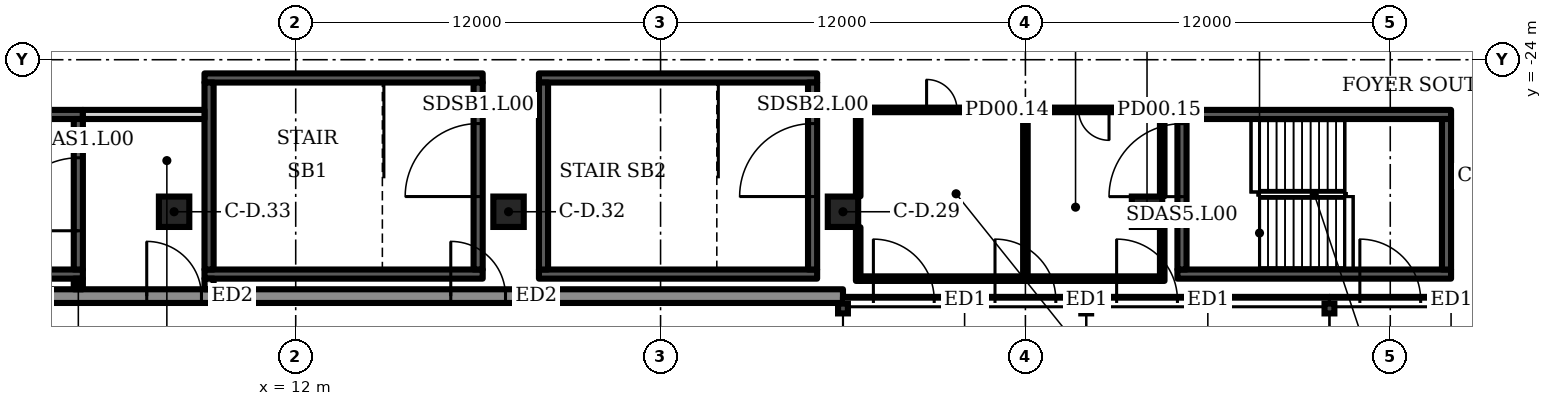
"""IFC4 building model, lengths in metres.
Left out: names, types, materials, properties, quantities, classifications, styles, units other than length and angle.
Written with IfcOpenShell. Run it as: python <this file> out.ifc"""

import sys

from ifc_helpers import new_model, si_unit, direction, frame, frame_2d, origin, origin_2d, place, context, subcontext, project, spatial, rectangle, hollow_circle, extrude, element, fill, save


model = new_model("IFC4")
c1 = context("Model", 3, precision=1e-05, world=origin(), true_north=direction((0.0, 1.0)))
c2 = subcontext(c1, "Body", "Model", "MODEL_VIEW")
j1 = project(units=[si_unit("LENGTHUNIT", "METRE"), si_unit("PLANEANGLEUNIT", "RADIAN")], contexts=[c1])
p1 = place(None, origin())
s1 = spatial("IfcSite", under=j1, at=p1, CompositionType="ELEMENT")
p2 = place(p1, origin())
s2 = spatial("IfcBuilding", under=s1, at=p2, CompositionType="ELEMENT")
p3 = place(p2, origin())
s3 = spatial("IfcBuildingStorey", under=s2, at=p3, CompositionType="ELEMENT", Elevation=0.0)
for number, where, z_axis, x_axis in (
    (1, (40.0, -29.0, 0.0), (0.0, 0.0, 1.0), (1.0, 0.0, 0.0)),
    (2, (30.0, -29.0, 0.0), (0.0, 0.0, 1.0), (1.0, 0.0, 0.0)),
    (3, (19.0, -29.0, 0.0), (0.0, 0.0, 1.0), (1.0, 0.0, 0.0)),
    (4, (8.0, -29.0, 0.0), (0.0, 0.0, 1.0), (1.0, 0.0, 0.0)),
):
    element("IfcColumn", number, at=place(p3, frame(where, z_axis=z_axis, x_axis=x_axis)), inside=s3, PredefinedType="COLUMN", context=c2, shape_type="SweptSolid", body=[
        extrude(rectangle(XDim=1.0, YDim=1.0, at=origin_2d()), origin(), (0.0, 0.0, 1.0), 8.0),
    ])
p4 = place(p3, frame((3.5, -31.775, 0.0), z_axis=(0.0, 0.0, 1.0), x_axis=(1.0, 0.0, 0.0)))
e5 = element("IfcWall", 5, at=p4, inside=s3, PredefinedType="SOLIDWALL", context=c2, shape_type="SweptSolid", body=[
    extrude(rectangle(XDim=26.5, YDim=0.45, at=frame_2d((13.25, 0.0))), origin(), (0.0, 0.0, 1.0), 7.7),
])
p5 = place(p4, frame((3.6, 0.0, 0.0)))
e6 = element("IfcOpeningElement", 6, at=p5, cuts=e5, PredefinedType="OPENING", context=c2, shape_type="SweptSolid", body=[
    extrude(rectangle(XDim=1.8, YDim=2.4, at=frame_2d((0.9, 1.2))), frame((0.0, 0.235, 0.0), z_axis=(0.0, -1.0, 0.0), x_axis=(1.0, 0.0, 0.0)), (0.0, 0.0, 1.0), 0.47),
])
p6 = place(p4, frame((13.6, 0.0, 0.0)))
e7 = element("IfcOpeningElement", 7, at=p6, cuts=e5, PredefinedType="OPENING", context=c2, shape_type="SweptSolid", body=[
    extrude(rectangle(XDim=1.8, YDim=2.4, at=frame_2d((0.9, 1.2))), frame((0.0, 0.235, 0.0), z_axis=(0.0, -1.0, 0.0), x_axis=(1.0, 0.0, 0.0)), (0.0, 0.0, 1.0), 0.47),
])
p7 = place(p3, frame((30.0, -31.9, 0.0), z_axis=(0.0, 0.0, 1.0), x_axis=(1.0, 0.0, 0.0)))
e8 = element("IfcWall", 8, at=p7, inside=s3, PredefinedType="SOLIDWALL", context=c2, shape_type="SweptSolid", body=[
    extrude(rectangle(XDim=8.0, YDim=0.2, at=frame_2d((4.0, 0.0))), origin(), (0.0, 0.0, 1.0), 2.6),
])
p8 = place(p7, frame((1.0, 0.0, 0.0)))
e9 = element("IfcOpeningElement", 9, at=p8, cuts=e8, PredefinedType="OPENING", context=c2, shape_type="SweptSolid", body=[
    extrude(rectangle(XDim=2.0, YDim=2.4, at=frame_2d((1.0, 1.2))), frame((0.0, 0.11, 0.0), z_axis=(0.0, -1.0, 0.0), x_axis=(1.0, 0.0, 0.0)), (0.0, 0.0, 1.0), 0.22),
])
p9 = place(p7, frame((5.0, 0.0, 0.0)))
e10 = element("IfcOpeningElement", 10, at=p9, cuts=e8, PredefinedType="OPENING", context=c2, shape_type="SweptSolid", body=[
    extrude(rectangle(XDim=2.0, YDim=2.4, at=frame_2d((1.0, 1.2))), frame((0.0, 0.11, 0.0), z_axis=(0.0, -1.0, 0.0), x_axis=(1.0, 0.0, 0.0)), (0.0, 0.0, 1.0), 0.22),
])
p10 = place(p3, frame((38.0, -31.9, 0.0), z_axis=(0.0, 0.0, 1.0), x_axis=(1.0, 0.0, 0.0)))
e11 = element("IfcWall", 11, at=p10, inside=s3, PredefinedType="SOLIDWALL", context=c2, shape_type="SweptSolid", body=[
    extrude(rectangle(XDim=8.0, YDim=0.2, at=frame_2d((4.0, 0.0))), origin(), (0.0, 0.0, 1.0), 2.6),
])
p11 = place(p10, frame((1.0, 0.0, 0.0)))
e12 = element("IfcOpeningElement", 12, at=p11, cuts=e11, PredefinedType="OPENING", context=c2, shape_type="SweptSolid", body=[
    extrude(rectangle(XDim=2.0, YDim=2.4, at=frame_2d((1.0, 1.2))), frame((0.0, 0.11, 0.0), z_axis=(0.0, -1.0, 0.0), x_axis=(1.0, 0.0, 0.0)), (0.0, 0.0, 1.0), 0.22),
])
p12 = place(p3, frame((46.0, -31.9, 0.0), z_axis=(0.0, 0.0, 1.0), x_axis=(1.0, 0.0, 0.0)))
e13 = element("IfcWall", 13, at=p12, inside=s3, PredefinedType="SOLIDWALL", context=c2, shape_type="SweptSolid", body=[
    extrude(rectangle(XDim=8.0, YDim=0.2, at=frame_2d((4.0, 0.0))), origin(), (0.0, 0.0, 1.0), 2.6),
])
p13 = place(p12, frame((1.0, 0.0, 0.0)))
e14 = element("IfcOpeningElement", 14, at=p13, cuts=e13, PredefinedType="OPENING", context=c2, shape_type="SweptSolid", body=[
    extrude(rectangle(XDim=2.0, YDim=2.4, at=frame_2d((1.0, 1.2))), frame((0.0, 0.11, 0.0), z_axis=(0.0, -1.0, 0.0), x_axis=(1.0, 0.0, 0.0)), (0.0, 0.0, 1.0), 0.22),
])
p14 = place(p12, frame((5.0, 0.0, 0.0)))
e15 = element("IfcOpeningElement", 15, at=p14, cuts=e13, PredefinedType="OPENING", context=c2, shape_type="SweptSolid", body=[
    extrude(rectangle(XDim=2.0, YDim=2.4, at=frame_2d((1.0, 1.2))), frame((0.0, 0.11, 0.0), z_axis=(0.0, -1.0, 0.0), x_axis=(1.0, 0.0, 0.0)), (0.0, 0.0, 1.0), 0.22),
])
p15 = place(p3, frame((30.575, -31.2, 0.0), z_axis=(0.0, 0.0, 1.0), x_axis=(1.0, 0.0, 0.0)))
e16 = element("IfcWall", 16, at=p15, inside=s3, PredefinedType="PARTITIONING", context=c2, shape_type="SweptSolid", body=[
    extrude(rectangle(XDim=5.35, YDim=0.15, at=frame_2d((2.675, 0.0))), origin(), (0.0, 0.0, 1.0), 7.7),
])
p16 = place(p3, frame((36.075, -31.2, 0.0), z_axis=(0.0, 0.0, 1.0), x_axis=(1.0, 0.0, 0.0)))
e17 = element("IfcWall", 17, at=p16, inside=s3, PredefinedType="PARTITIONING", context=c2, shape_type="SweptSolid", body=[
    extrude(rectangle(XDim=4.35, YDim=0.15, at=frame_2d((2.175, 0.0))), origin(), (0.0, 0.0, 1.0), 7.7),
])
p17 = place(p3, frame((36.0, -31.275, 0.0), z_axis=(0.0, 0.0, 1.0), x_axis=(0.0, 1.0, 0.0)))
e18 = element("IfcWall", 18, at=p17, inside=s3, PredefinedType="PARTITIONING", context=c2, shape_type="SweptSolid", body=[
    extrude(rectangle(XDim=5.7, YDim=0.15, at=frame_2d((2.85, 0.0))), origin(), (0.0, 0.0, 1.0), 7.7),
])
p18 = place(p3, frame((30.575, -25.65, 0.0), z_axis=(0.0, 0.0, 1.0), x_axis=(1.0, 0.0, 0.0)))
e19 = element("IfcWall", 19, at=p18, inside=s3, PredefinedType="PARTITIONING", context=c2, shape_type="SweptSolid", body=[
    extrude(rectangle(XDim=5.35, YDim=0.15, at=frame_2d((2.675, 0.0))), origin(), (0.0, 0.0, 1.0), 7.7),
])
p19 = place(p18, frame((2.175, 0.0, 0.0)))
e20 = element("IfcOpeningElement", 20, at=p19, cuts=e19, PredefinedType="OPENING", context=c2, shape_type="SweptSolid", body=[
    extrude(rectangle(XDim=1.0, YDim=2.1, at=frame_2d((0.5, 1.05))), frame((0.0, 0.085, 0.0), z_axis=(0.0, -1.0, 0.0), x_axis=(1.0, 0.0, 0.0)), (0.0, 0.0, 1.0), 0.17),
])
p20 = place(p3, frame((36.075, -25.65, 0.0), z_axis=(0.0, 0.0, 1.0), x_axis=(1.0, 0.0, 0.0)))
e21 = element("IfcWall", 21, at=p20, inside=s3, PredefinedType="PARTITIONING", context=c2, shape_type="SweptSolid", body=[
    extrude(rectangle(XDim=4.35, YDim=0.15, at=frame_2d((2.175, 0.0))), origin(), (0.0, 0.0, 1.0), 7.7),
])
p21 = place(p20, frame((1.675, 0.0, 0.0)))
e22 = element("IfcOpeningElement", 22, at=p21, cuts=e21, PredefinedType="OPENING", context=c2, shape_type="SweptSolid", body=[
    extrude(rectangle(XDim=1.0, YDim=2.1, at=frame_2d((0.5, 1.05))), frame((0.0, 0.085, 0.0), z_axis=(0.0, -1.0, 0.0), x_axis=(1.0, 0.0, 0.0)), (0.0, 0.0, 1.0), 0.17),
])
p22 = place(p3, frame((30.5, -31.275, 0.0), z_axis=(0.0, 0.0, 1.0), x_axis=(0.0, 1.0, 0.0)))
e23 = element("IfcWall", 23, at=p22, inside=s3, PredefinedType="PARTITIONING", context=c2, shape_type="SweptSolid", body=[
    extrude(rectangle(XDim=1.765, YDim=0.15, at=frame_2d((0.882, 0.0))), origin(), (0.0, 0.0, 1.0), 7.7),
])
p23 = place(p3, frame((30.5, -28.49, 0.0), z_axis=(0.0, 0.0, 1.0), x_axis=(0.0, 1.0, 0.0)))
e24 = element("IfcWall", 24, at=p23, inside=s3, PredefinedType="PARTITIONING", context=c2, shape_type="SweptSolid", body=[
    extrude(rectangle(XDim=2.915, YDim=0.15, at=frame_2d((1.458, 0.0))), origin(), (0.0, 0.0, 1.0), 7.7),
])
p24 = place(p3, frame((40.5, -31.275, 0.0), z_axis=(0.0, 0.0, 1.0), x_axis=(0.0, 1.0, 0.0)))
e25 = element("IfcWall", 25, at=p24, inside=s3, PredefinedType="PARTITIONING", context=c2, shape_type="SweptSolid", body=[
    extrude(rectangle(XDim=1.765, YDim=0.15, at=frame_2d((0.882, 0.0))), origin(), (0.0, 0.0, 1.0), 7.7),
])
p25 = place(p3, frame((40.5, -28.49, 0.0), z_axis=(0.0, 0.0, 1.0), x_axis=(0.0, 1.0, 0.0)))
e26 = element("IfcWall", 26, at=p25, inside=s3, PredefinedType="PARTITIONING", context=c2, shape_type="SweptSolid", body=[
    extrude(rectangle(XDim=2.915, YDim=0.15, at=frame_2d((1.458, 0.0))), origin(), (0.0, 0.0, 1.0), 7.7),
])
p26 = place(p3, frame((-4.5, -31.05, 0.0), z_axis=(0.0, 0.0, 1.0), x_axis=(1.0, 0.0, 0.0)))
e27 = element("IfcWall", 27, at=p26, inside=s3, PredefinedType="SHEAR", context=c2, shape_type="SweptSolid", body=[
    extrude(rectangle(XDim=9.5, YDim=0.3, at=frame_2d((4.75, 0.0))), origin(), (0.0, 0.0, 1.0), 7.7),
])
p27 = place(p3, frame((-4.0, -25.8, 0.0), z_axis=(0.0, 0.0, 1.0), x_axis=(1.0, 0.0, 0.0)))
e28 = element("IfcWall", 28, at=p27, inside=s3, PredefinedType="SHEAR", context=c2, shape_type="SweptSolid", body=[
    extrude(rectangle(XDim=9.0, YDim=0.3, at=frame_2d((4.5, 0.0))), origin(), (0.0, 0.0, 1.0), 7.7),
])
p28 = place(p3, frame((4.85, -30.9, 0.0), z_axis=(0.0, 0.0, 1.0), x_axis=(0.0, 1.0, 0.0)))
e29 = element("IfcWall", 29, at=p28, inside=s3, PredefinedType="SHEAR", context=c2, shape_type="SweptSolid", body=[
    extrude(rectangle(XDim=4.95, YDim=0.3, at=frame_2d((2.475, 0.0))), origin(), (0.0, 0.0, 1.0), 7.7),
])
p29 = place(p28, frame((1.275, 0.0, 0.0)))
e30 = element("IfcOpeningElement", 30, at=p29, cuts=e29, PredefinedType="OPENING", context=c2, shape_type="SweptSolid", body=[
    extrude(rectangle(XDim=2.4, YDim=2.1, at=frame_2d((1.2, 1.05))), frame((0.0, 0.16, 0.0), z_axis=(0.0, -1.0, 0.0), x_axis=(1.0, 0.0, 0.0)), (0.0, 0.0, 1.0), 0.32),
])
for number, where, z_axis, x_axis in (
    (31, (41.0, -31.05, 0.0), (0.0, 0.0, 1.0), (1.0, 0.0, 0.0)),
    (32, (41.0, -25.8, 0.0), (0.0, 0.0, 1.0), (1.0, 0.0, 0.0)),
):
    element("IfcWall", number, at=place(p3, frame(where, z_axis=z_axis, x_axis=x_axis)), inside=s3, PredefinedType="SHEAR", context=c2, shape_type="SweptSolid", body=[
        extrude(rectangle(XDim=9.0, YDim=0.3, at=frame_2d((4.5, 0.0))), origin(), (0.0, 0.0, 1.0), 7.7),
    ])
p30 = place(p3, frame((41.15, -30.9, 0.0), z_axis=(0.0, 0.0, 1.0), x_axis=(0.0, 1.0, 0.0)))
e33 = element("IfcWall", 33, at=p30, inside=s3, PredefinedType="SHEAR", context=c2, shape_type="SweptSolid", body=[
    extrude(rectangle(XDim=4.95, YDim=0.3, at=frame_2d((2.475, 0.0))), origin(), (0.0, 0.0, 1.0), 7.7),
])
p31 = place(p30, frame((2.397, 0.0, 0.0)))
e34 = element("IfcOpeningElement", 34, at=p31, cuts=e33, PredefinedType="OPENING", context=c2, shape_type="SweptSolid", body=[
    extrude(rectangle(XDim=2.4, YDim=2.1, at=frame_2d((1.2, 1.05))), frame((0.0, 0.16, 0.0), z_axis=(0.0, -1.0, 0.0), x_axis=(1.0, 0.0, 0.0)), (0.0, 0.0, 1.0), 0.32),
])
p32 = place(p3, frame((49.85, -30.9, 0.0), z_axis=(0.0, 0.0, 1.0), x_axis=(0.0, 1.0, 0.0)))
e35 = element("IfcWall", 35, at=p32, inside=s3, PredefinedType="SHEAR", context=c2, shape_type="SweptSolid", body=[
    extrude(rectangle(XDim=4.95, YDim=0.3, at=frame_2d((2.475, 0.0))), origin(), (0.0, 0.0, 1.0), 7.7),
])
for number, where, z_axis, x_axis in (
    (36, (9.0, -31.05, 0.0), (0.0, 0.0, 1.0), (1.0, 0.0, 0.0)),
    (37, (9.0, -24.6, 0.0), (0.0, 0.0, 1.0), (1.0, 0.0, 0.0)),
):
    element("IfcWall", number, at=place(p3, frame(where, z_axis=z_axis, x_axis=x_axis)), inside=s3, PredefinedType="SHEAR", context=c2, shape_type="SweptSolid", body=[
        extrude(rectangle(XDim=9.15, YDim=0.3, at=frame_2d((4.575, 0.0))), origin(), (0.0, 0.0, 1.0), 7.7),
    ])
p33 = place(p3, frame((9.15, -30.9, 0.0), z_axis=(0.0, 0.0, 1.0), x_axis=(0.0, 1.0, 0.0)))
e38 = element("IfcWall", 38, at=p33, inside=s3, PredefinedType="SHEAR", context=c2, shape_type="SweptSolid", body=[
    extrude(rectangle(XDim=6.15, YDim=0.3, at=frame_2d((3.075, 0.0))), origin(), (0.0, 0.0, 1.0), 7.7),
])
p34 = place(p3, frame((18.0, -30.9, 0.0), z_axis=(0.0, 0.0, 1.0), x_axis=(0.0, 1.0, 0.0)))
e39 = element("IfcWall", 39, at=p34, inside=s3, PredefinedType="SHEAR", context=c2, shape_type="SweptSolid", body=[
    extrude(rectangle(XDim=6.15, YDim=0.3, at=frame_2d((3.075, 0.0))), origin(), (0.0, 0.0, 1.0), 7.7),
])
p35 = place(p34, frame((2.4, 0.0, 0.0)))
e40 = element("IfcOpeningElement", 40, at=p35, cuts=e39, PredefinedType="OPENING", context=c2, shape_type="SweptSolid", body=[
    extrude(rectangle(XDim=2.4, YDim=2.1, at=frame_2d((1.2, 1.05))), frame((0.0, 0.16, 0.0), z_axis=(0.0, -1.0, 0.0), x_axis=(1.0, 0.0, 0.0)), (0.0, 0.0, 1.0), 0.32),
])
for number, where, z_axis, x_axis in (
    (41, (20.0, -31.05, 0.0), (0.0, 0.0, 1.0), (1.0, 0.0, 0.0)),
    (42, (20.0, -24.6, 0.0), (0.0, 0.0, 1.0), (1.0, 0.0, 0.0)),
):
    element("IfcWall", number, at=place(p3, frame(where, z_axis=z_axis, x_axis=x_axis)), inside=s3, PredefinedType="SHEAR", context=c2, shape_type="SweptSolid", body=[
        extrude(rectangle(XDim=9.15, YDim=0.3, at=frame_2d((4.575, 0.0))), origin(), (0.0, 0.0, 1.0), 7.7),
    ])
p36 = place(p3, frame((20.15, -30.9, 0.0), z_axis=(0.0, 0.0, 1.0), x_axis=(0.0, 1.0, 0.0)))
e43 = element("IfcWall", 43, at=p36, inside=s3, PredefinedType="SHEAR", context=c2, shape_type="SweptSolid", body=[
    extrude(rectangle(XDim=6.15, YDim=0.3, at=frame_2d((3.075, 0.0))), origin(), (0.0, 0.0, 1.0), 7.7),
])
p37 = place(p3, frame((29.0, -30.9, 0.0), z_axis=(0.0, 0.0, 1.0), x_axis=(0.0, 1.0, 0.0)))
e44 = element("IfcWall", 44, at=p37, inside=s3, PredefinedType="SHEAR", context=c2, shape_type="SweptSolid", body=[
    extrude(rectangle(XDim=6.15, YDim=0.3, at=frame_2d((3.075, 0.0))), origin(), (0.0, 0.0, 1.0), 7.7),
])
p38 = place(p37, frame((2.4, 0.0, 0.0)))
e45 = element("IfcOpeningElement", 45, at=p38, cuts=e44, PredefinedType="OPENING", context=c2, shape_type="SweptSolid", body=[
    extrude(rectangle(XDim=2.4, YDim=2.1, at=frame_2d((1.2, 1.05))), frame((0.0, 0.16, 0.0), z_axis=(0.0, -1.0, 0.0), x_axis=(1.0, 0.0, 0.0)), (0.0, 0.0, 1.0), 0.32),
])
p39 = place(p3, frame((5.0, -25.8, 0.0), z_axis=(0.0, 0.0, 1.0), x_axis=(1.0, 0.0, 0.0)))
e46 = element("IfcWall", 46, at=p39, inside=s3, PredefinedType="PARTITIONING", context=c2, shape_type="SweptSolid", body=[
    extrude(rectangle(XDim=4.0, YDim=0.3, at=frame_2d((2.0, 0.0))), origin(), (0.0, 0.0, 1.0), 7.7),
])
for number, where, z_axis, x_axis in (
    (47, (4.85, -31.55, 0.0), (0.0, 0.0, 1.0), (0.0, 1.0, 0.0)),
    (48, (9.15, -31.55, 0.0), (0.0, 0.0, 1.0), (0.0, 1.0, 0.0)),
):
    element("IfcWall", number, at=place(p3, frame(where, z_axis=z_axis, x_axis=x_axis)), inside=s3, PredefinedType="PARTITIONING", context=c2, shape_type="SweptSolid", body=[
        extrude(rectangle(XDim=0.35, YDim=0.3, at=frame_2d((0.175, 0.0))), origin(), (0.0, 0.0, 1.0), 7.7),
    ])
for number, where, z_axis, x_axis in (
    (49, (30.0, -32.182, 0.0), (0.0, 0.0, 1.0), (1.0, 0.0, 0.0)),
    (50, (38.0, -32.182, 0.0), (0.0, 0.0, 1.0), (1.0, 0.0, 0.0)),
    (51, (46.0, -32.182, 0.0), (0.0, 0.0, 1.0), (1.0, 0.0, 0.0)),
):
    element("IfcColumn", number, at=place(p3, frame(where, z_axis=z_axis, x_axis=x_axis)), inside=s3, PredefinedType="COLUMN", context=c2, shape_type="SweptSolid", body=[
        extrude(hollow_circle(Radius=0.162, WallThickness=0.01, at=origin_2d()), origin(), (0.0, 0.0, 1.0), 3.2),
    ])
p40 = place(p5, origin())
e52 = element("IfcDoor", 52, at=p40, inside=s3, OperationType="DOUBLE_DOOR_DOUBLE_SWING", PredefinedType="DOOR", context=c2, shape_type="SweptSolid", body=[
    extrude(rectangle(XDim=1.8, YDim=2.4, at=frame_2d((0.9, 1.2))), frame((0.0, 0.025, 0.0), z_axis=(0.0, -1.0, 0.0), x_axis=(1.0, 0.0, 0.0)), (0.0, 0.0, 1.0), 0.05),
])
fill(e6, e52)
p41 = place(p6, origin())
e53 = element("IfcDoor", 53, at=p41, inside=s3, OperationType="DOUBLE_DOOR_DOUBLE_SWING", PredefinedType="DOOR", context=c2, shape_type="SweptSolid", body=[
    extrude(rectangle(XDim=1.8, YDim=2.4, at=frame_2d((0.9, 1.2))), frame((0.0, 0.025, 0.0), z_axis=(0.0, -1.0, 0.0), x_axis=(1.0, 0.0, 0.0)), (0.0, 0.0, 1.0), 0.05),
])
fill(e7, e53)
p42 = place(p8, origin())
e54 = element("IfcDoor", 54, at=p42, inside=s3, OperationType="DOUBLE_DOOR_DOUBLE_SWING", PredefinedType="DOOR", context=c2, shape_type="SweptSolid", body=[
    extrude(rectangle(XDim=2.0, YDim=2.4, at=frame_2d((1.0, 1.2))), frame((0.0, 0.025, 0.0), z_axis=(0.0, -1.0, 0.0), x_axis=(1.0, 0.0, 0.0)), (0.0, 0.0, 1.0), 0.05),
])
fill(e9, e54)
p43 = place(p9, origin())
e55 = element("IfcDoor", 55, at=p43, inside=s3, OperationType="DOUBLE_DOOR_DOUBLE_SWING", PredefinedType="DOOR", context=c2, shape_type="SweptSolid", body=[
    extrude(rectangle(XDim=2.0, YDim=2.4, at=frame_2d((1.0, 1.2))), frame((0.0, 0.025, 0.0), z_axis=(0.0, -1.0, 0.0), x_axis=(1.0, 0.0, 0.0)), (0.0, 0.0, 1.0), 0.05),
])
fill(e10, e55)
p44 = place(p11, origin())
e56 = element("IfcDoor", 56, at=p44, inside=s3, OperationType="DOUBLE_DOOR_DOUBLE_SWING", PredefinedType="DOOR", context=c2, shape_type="SweptSolid", body=[
    extrude(rectangle(XDim=2.0, YDim=2.4, at=frame_2d((1.0, 1.2))), frame((0.0, 0.025, 0.0), z_axis=(0.0, -1.0, 0.0), x_axis=(1.0, 0.0, 0.0)), (0.0, 0.0, 1.0), 0.05),
])
fill(e12, e56)
p45 = place(p13, origin())
e57 = element("IfcDoor", 57, at=p45, inside=s3, OperationType="DOUBLE_DOOR_DOUBLE_SWING", PredefinedType="DOOR", context=c2, shape_type="SweptSolid", body=[
    extrude(rectangle(XDim=2.0, YDim=2.4, at=frame_2d((1.0, 1.2))), frame((0.0, 0.025, 0.0), z_axis=(0.0, -1.0, 0.0), x_axis=(1.0, 0.0, 0.0)), (0.0, 0.0, 1.0), 0.05),
])
fill(e14, e57)
p46 = place(p19, origin())
e58 = element("IfcDoor", 58, at=p46, inside=s3, OperationType="SINGLE_SWING_LEFT", PredefinedType="DOOR", context=c2, shape_type="SweptSolid", body=[
    extrude(rectangle(XDim=1.0, YDim=2.1, at=frame_2d((0.5, 1.05))), frame((0.0, 0.025, 0.0), z_axis=(0.0, -1.0, 0.0), x_axis=(1.0, 0.0, 0.0)), (0.0, 0.0, 1.0), 0.05),
])
fill(e20, e58)
p47 = place(p21, origin())
e59 = element("IfcDoor", 59, at=p47, inside=s3, OperationType="SINGLE_SWING_RIGHT", PredefinedType="DOOR", context=c2, shape_type="SweptSolid", body=[
    extrude(rectangle(XDim=1.0, YDim=2.1, at=frame_2d((0.5, 1.05))), frame((0.0, 0.025, 0.0), z_axis=(0.0, -1.0, 0.0), x_axis=(1.0, 0.0, 0.0)), (0.0, 0.0, 1.0), 0.05),
])
fill(e22, e59)
p48 = place(p29, origin())
e60 = element("IfcDoor", 60, at=p48, inside=s3, OperationType="DOUBLE_DOOR_SINGLE_SWING", PredefinedType="DOOR", context=c2, shape_type="SweptSolid", body=[
    extrude(rectangle(XDim=2.4, YDim=2.1, at=frame_2d((1.2, 1.05))), frame((0.0, 0.025, 0.0), z_axis=(0.0, -1.0, 0.0), x_axis=(1.0, 0.0, 0.0)), (0.0, 0.0, 1.0), 0.05),
])
fill(e30, e60)
p49 = place(p31, origin())
e61 = element("IfcDoor", 61, at=p49, inside=s3, OperationType="DOUBLE_DOOR_SINGLE_SWING", PredefinedType="DOOR", context=c2, shape_type="SweptSolid", body=[
    extrude(rectangle(XDim=2.4, YDim=2.1, at=frame_2d((1.2, 1.05))), frame((0.0, 0.025, 0.0), z_axis=(0.0, -1.0, 0.0), x_axis=(1.0, 0.0, 0.0)), (0.0, 0.0, 1.0), 0.05),
])
fill(e34, e61)
p50 = place(p35, origin())
e62 = element("IfcDoor", 62, at=p50, inside=s3, OperationType="DOUBLE_DOOR_SINGLE_SWING", PredefinedType="DOOR", context=c2, shape_type="SweptSolid", body=[
    extrude(rectangle(XDim=2.4, YDim=2.1, at=frame_2d((1.2, 1.05))), frame((0.0, 0.025, 0.0), z_axis=(0.0, -1.0, 0.0), x_axis=(1.0, 0.0, 0.0)), (0.0, 0.0, 1.0), 0.05),
])
fill(e40, e62)
p51 = place(p38, origin())
e63 = element("IfcDoor", 63, at=p51, inside=s3, OperationType="DOUBLE_DOOR_SINGLE_SWING", PredefinedType="DOOR", context=c2, shape_type="SweptSolid", body=[
    extrude(rectangle(XDim=2.4, YDim=2.1, at=frame_2d((1.2, 1.05))), frame((0.0, 0.025, 0.0), z_axis=(0.0, -1.0, 0.0), x_axis=(1.0, 0.0, 0.0)), (0.0, 0.0, 1.0), 0.05),
])
fill(e45, e63)
save(model, sys.argv[1])
